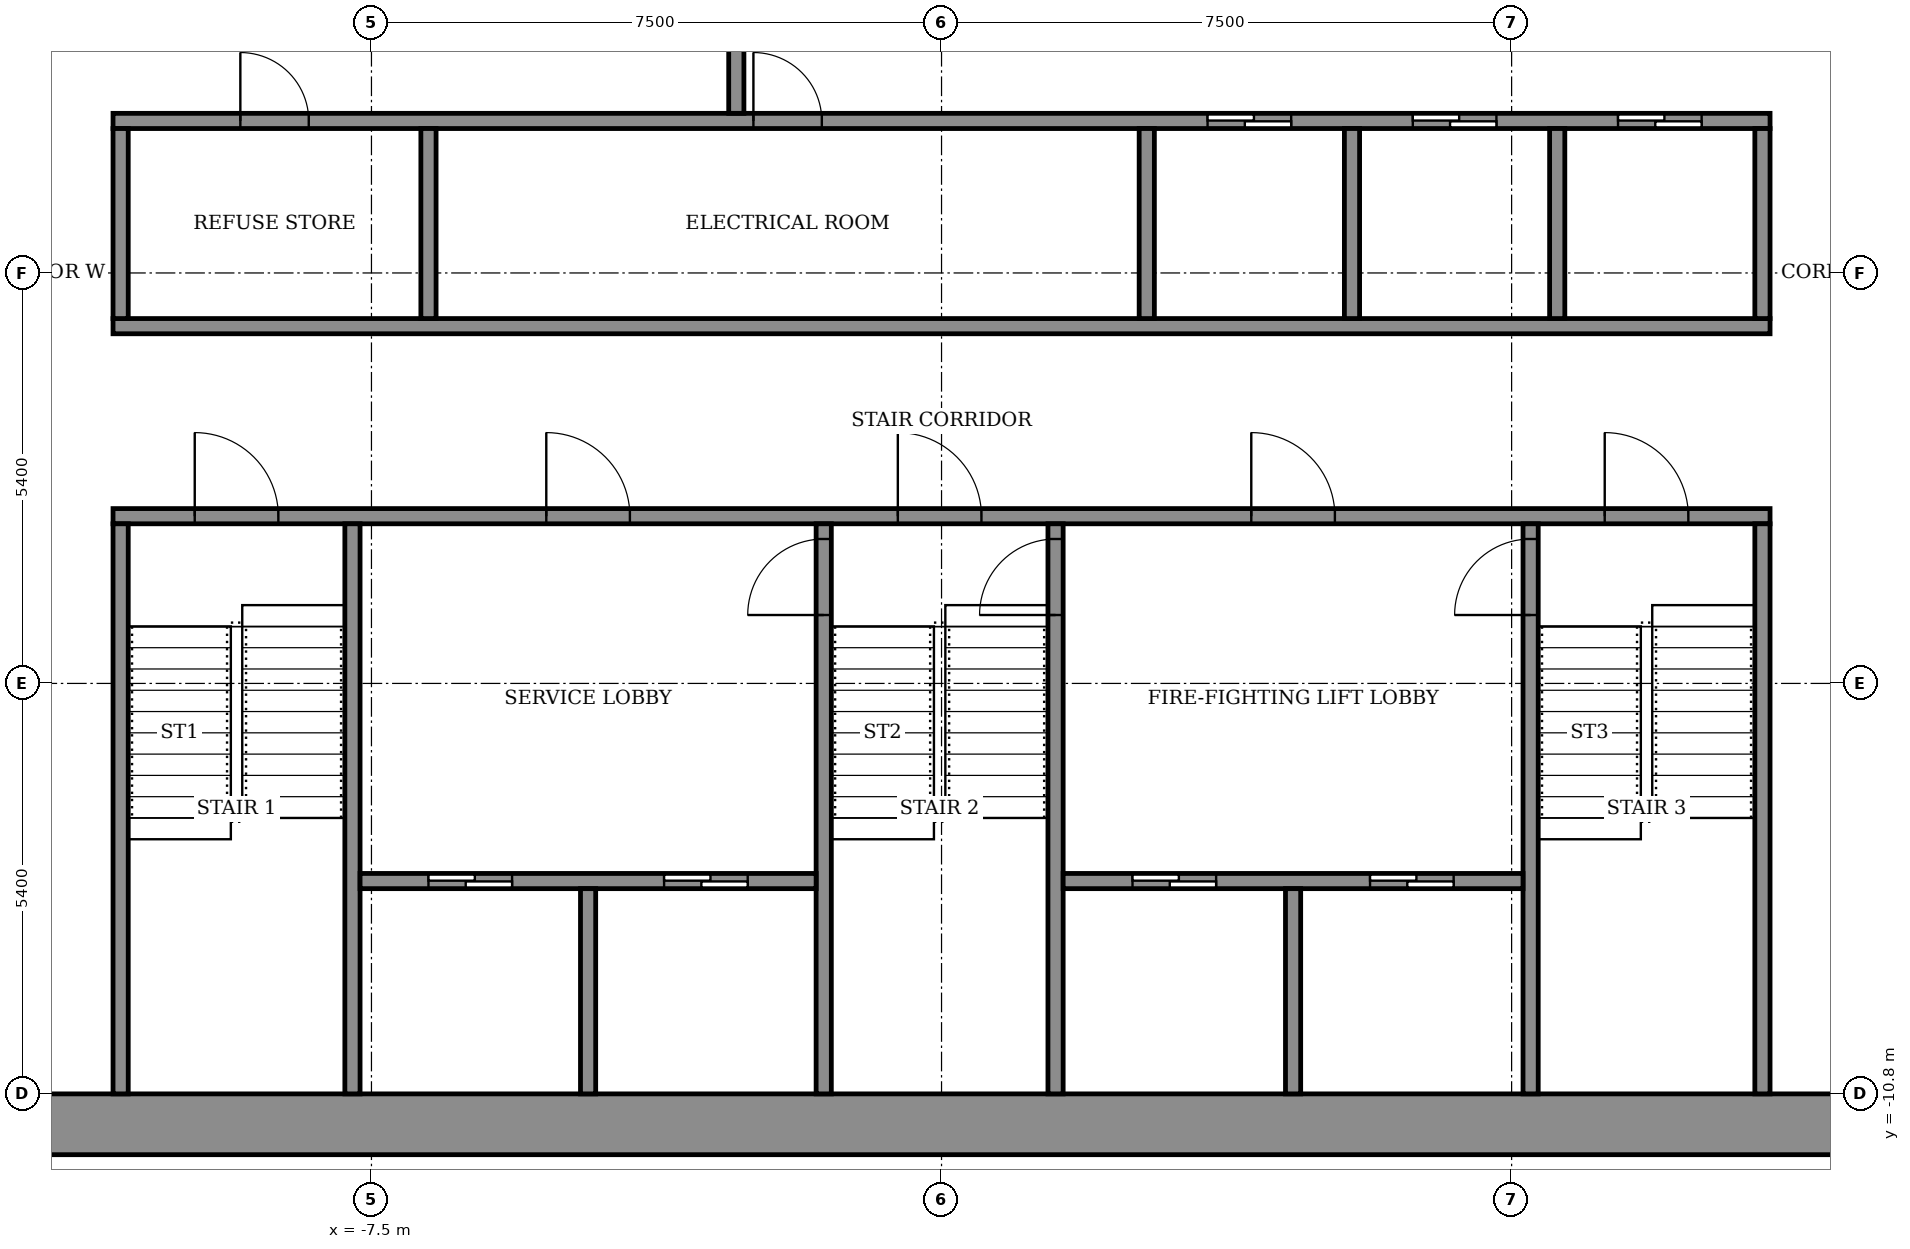
"""IFC4 building model, lengths in metres.
Left out: names, types, materials, properties, quantities, classifications, styles, units other than length and angle.
Written with IfcOpenShell. Run it as: python <this file> out.ifc"""

import sys

from ifc_helpers import new_model, si_unit, direction, frame, frame_2d, origin, place, context, subcontext, project, spatial, rectangle, extrude, element, fill, save


model = new_model("IFC4")
c1 = context("Model", 3, precision=1e-05, world=origin(), true_north=direction((0.0, 1.0)))
c2 = subcontext(c1, "Body", "Model", "MODEL_VIEW")
j1 = project(units=[si_unit("LENGTHUNIT", "METRE"), si_unit("PLANEANGLEUNIT", "RADIAN")], contexts=[c1])
p1 = place(None, origin())
s1 = spatial("IfcSite", under=j1, at=p1, CompositionType="ELEMENT")
p2 = place(p1, origin())
s2 = spatial("IfcBuilding", under=s1, at=p2, CompositionType="ELEMENT")
p3 = place(p2, frame((0.0, 0.0, 197.9)))
s3 = spatial("IfcBuildingStorey", under=s2, at=p3, CompositionType="ELEMENT", Elevation=197.9)
p4 = place(p3, frame((-14.6, -11.2, 0.0), z_axis=(0.0, 0.0, 1.0), x_axis=(1.0, 0.0, 0.0)))
e1 = element("IfcWall", 1, at=p4, inside=s3, PredefinedType="SHEAR", context=c2, shape_type="SweptSolid", body=[
    extrude(rectangle(XDim=29.2, YDim=0.8, at=frame_2d((14.6, 0.0))), origin(), (0.0, 0.0, 1.0), 3.6),
])
p5 = place(p3, frame((-10.9, -3.2, 0.0), z_axis=(0.0, 0.0, 1.0), x_axis=(1.0, 0.0, 0.0)))
e2 = element("IfcWall", 2, at=p5, inside=s3, PredefinedType="SHEAR", context=c2, shape_type="SweptSolid", body=[
    extrude(rectangle(XDim=21.8, YDim=0.2, at=frame_2d((10.9, 0.0))), origin(), (0.0, 0.0, 1.0), 3.05),
])
p6 = place(p5, frame((1.075, 0.0, 0.0)))
e3 = element("IfcOpeningElement", 3, at=p6, cuts=e2, PredefinedType="OPENING", context=c2, shape_type="SweptSolid", body=[
    extrude(rectangle(XDim=1.1, YDim=2.1, at=frame_2d((0.55, 1.05))), frame((0.0, 0.11, 0.0), z_axis=(0.0, -1.0, 0.0), x_axis=(1.0, 0.0, 0.0)), (0.0, 0.0, 1.0), 0.22),
])
p7 = place(p5, frame((10.325, 0.0, 0.0)))
e4 = element("IfcOpeningElement", 4, at=p7, cuts=e2, PredefinedType="OPENING", context=c2, shape_type="SweptSolid", body=[
    extrude(rectangle(XDim=1.1, YDim=2.1, at=frame_2d((0.55, 1.05))), frame((0.0, 0.11, 0.0), z_axis=(0.0, -1.0, 0.0), x_axis=(1.0, 0.0, 0.0)), (0.0, 0.0, 1.0), 0.22),
])
p8 = place(p5, frame((19.625, 0.0, 0.0)))
e5 = element("IfcOpeningElement", 5, at=p8, cuts=e2, PredefinedType="OPENING", context=c2, shape_type="SweptSolid", body=[
    extrude(rectangle(XDim=1.1, YDim=2.1, at=frame_2d((0.55, 1.05))), frame((0.0, 0.11, 0.0), z_axis=(0.0, -1.0, 0.0), x_axis=(1.0, 0.0, 0.0)), (0.0, 0.0, 1.0), 0.22),
])
p9 = place(p5, frame((5.7, 0.0, 0.0)))
e6 = element("IfcOpeningElement", 6, at=p9, cuts=e2, PredefinedType="OPENING", context=c2, shape_type="SweptSolid", body=[
    extrude(rectangle(XDim=1.1, YDim=2.1, at=frame_2d((0.55, 1.05))), frame((0.0, 0.11, 0.0), z_axis=(0.0, -1.0, 0.0), x_axis=(1.0, 0.0, 0.0)), (0.0, 0.0, 1.0), 0.22),
])
p10 = place(p5, frame((14.975, 0.0, 0.0)))
e7 = element("IfcOpeningElement", 7, at=p10, cuts=e2, PredefinedType="OPENING", context=c2, shape_type="SweptSolid", body=[
    extrude(rectangle(XDim=1.1, YDim=2.1, at=frame_2d((0.55, 1.05))), frame((0.0, 0.11, 0.0), z_axis=(0.0, -1.0, 0.0), x_axis=(1.0, 0.0, 0.0)), (0.0, 0.0, 1.0), 0.22),
])
p11 = place(p3, frame((-10.9, -0.7, 0.0), z_axis=(0.0, 0.0, 1.0), x_axis=(1.0, 0.0, 0.0)))
e8 = element("IfcWall", 8, at=p11, inside=s3, PredefinedType="SHEAR", context=c2, shape_type="SweptSolid", body=[
    extrude(rectangle(XDim=21.8, YDim=0.2, at=frame_2d((10.9, 0.0))), origin(), (0.0, 0.0, 1.0), 3.05),
])
p12 = place(p3, frame((-10.9, 2.0, 0.0), z_axis=(0.0, 0.0, 1.0), x_axis=(1.0, 0.0, 0.0)))
e9 = element("IfcWall", 9, at=p12, inside=s3, PredefinedType="SHEAR", context=c2, shape_type="SweptSolid", body=[
    extrude(rectangle(XDim=21.8, YDim=0.2, at=frame_2d((10.9, 0.0))), origin(), (0.0, 0.0, 1.0), 3.05),
])
p13 = place(p12, frame((14.4, 0.0, 0.0)))
e10 = element("IfcOpeningElement", 10, at=p13, cuts=e9, PredefinedType="OPENING", context=c2, shape_type="SweptSolid", body=[
    extrude(rectangle(XDim=1.1, YDim=2.1, at=frame_2d((0.55, 1.05))), frame((0.0, 0.11, 0.0), z_axis=(0.0, -1.0, 0.0), x_axis=(1.0, 0.0, 0.0)), (0.0, 0.0, 1.0), 0.22),
])
p14 = place(p12, frame((17.1, 0.0, 0.0)))
e11 = element("IfcOpeningElement", 11, at=p14, cuts=e9, PredefinedType="OPENING", context=c2, shape_type="SweptSolid", body=[
    extrude(rectangle(XDim=1.1, YDim=2.1, at=frame_2d((0.55, 1.05))), frame((0.0, 0.11, 0.0), z_axis=(0.0, -1.0, 0.0), x_axis=(1.0, 0.0, 0.0)), (0.0, 0.0, 1.0), 0.22),
])
p15 = place(p12, frame((19.8, 0.0, 0.0)))
e12 = element("IfcOpeningElement", 12, at=p15, cuts=e9, PredefinedType="OPENING", context=c2, shape_type="SweptSolid", body=[
    extrude(rectangle(XDim=1.1, YDim=2.1, at=frame_2d((0.55, 1.05))), frame((0.0, 0.11, 0.0), z_axis=(0.0, -1.0, 0.0), x_axis=(1.0, 0.0, 0.0)), (0.0, 0.0, 1.0), 0.22),
])
p16 = place(p12, frame((1.675, 0.0, 0.0)))
e13 = element("IfcOpeningElement", 13, at=p16, cuts=e9, PredefinedType="OPENING", context=c2, shape_type="SweptSolid", body=[
    extrude(rectangle(XDim=0.9, YDim=2.1, at=frame_2d((0.45, 1.05))), frame((0.0, 0.11, 0.0), z_axis=(0.0, -1.0, 0.0), x_axis=(1.0, 0.0, 0.0)), (0.0, 0.0, 1.0), 0.22),
])
p17 = place(p12, frame((8.425, 0.0, 0.0)))
e14 = element("IfcOpeningElement", 14, at=p17, cuts=e9, PredefinedType="OPENING", context=c2, shape_type="SweptSolid", body=[
    extrude(rectangle(XDim=0.9, YDim=2.1, at=frame_2d((0.45, 1.05))), frame((0.0, 0.11, 0.0), z_axis=(0.0, -1.0, 0.0), x_axis=(1.0, 0.0, 0.0)), (0.0, 0.0, 1.0), 0.22),
])
for number, where, z_axis, x_axis in (
    (15, (-10.8, -10.8, 0.0), (0.0, 0.0, 1.0), (0.0, 1.0, 0.0)),
    (16, (-7.75, -10.8, 0.0), (0.0, 0.0, 1.0), (0.0, 1.0, 0.0)),
):
    element("IfcWall", number, at=place(p3, frame(where, z_axis=z_axis, x_axis=x_axis)), inside=s3, PredefinedType="SHEAR", context=c2, shape_type="SweptSolid", body=[
        extrude(rectangle(XDim=7.5, YDim=0.2, at=frame_2d((3.75, 0.0))), origin(), (0.0, 0.0, 1.0), 3.05),
    ])
p18 = place(p3, frame((-1.55, -10.8, 0.0), z_axis=(0.0, 0.0, 1.0), x_axis=(0.0, 1.0, 0.0)))
e17 = element("IfcWall", 17, at=p18, inside=s3, PredefinedType="SHEAR", context=c2, shape_type="SweptSolid", body=[
    extrude(rectangle(XDim=7.5, YDim=0.2, at=frame_2d((3.75, 0.0))), origin(), (0.0, 0.0, 1.0), 3.05),
])
p19 = place(p18, frame((6.3, 0.0, 0.0)))
e18 = element("IfcOpeningElement", 18, at=p19, cuts=e17, PredefinedType="OPENING", context=c2, shape_type="SweptSolid", body=[
    extrude(rectangle(XDim=1.0, YDim=2.1, at=frame_2d((0.5, 1.05))), frame((0.0, 0.11, 0.0), z_axis=(0.0, -1.0, 0.0), x_axis=(1.0, 0.0, 0.0)), (0.0, 0.0, 1.0), 0.22),
])
p20 = place(p3, frame((1.5, -10.8, 0.0), z_axis=(0.0, 0.0, 1.0), x_axis=(0.0, 1.0, 0.0)))
e19 = element("IfcWall", 19, at=p20, inside=s3, PredefinedType="SHEAR", context=c2, shape_type="SweptSolid", body=[
    extrude(rectangle(XDim=7.5, YDim=0.2, at=frame_2d((3.75, 0.0))), origin(), (0.0, 0.0, 1.0), 3.05),
])
p21 = place(p20, frame((6.3, 0.0, 0.0)))
e20 = element("IfcOpeningElement", 20, at=p21, cuts=e19, PredefinedType="OPENING", context=c2, shape_type="SweptSolid", body=[
    extrude(rectangle(XDim=1.0, YDim=2.1, at=frame_2d((0.5, 1.05))), frame((0.0, 0.11, 0.0), z_axis=(0.0, -1.0, 0.0), x_axis=(1.0, 0.0, 0.0)), (0.0, 0.0, 1.0), 0.22),
])
p22 = place(p3, frame((7.75, -10.8, 0.0), z_axis=(0.0, 0.0, 1.0), x_axis=(0.0, 1.0, 0.0)))
e21 = element("IfcWall", 21, at=p22, inside=s3, PredefinedType="SHEAR", context=c2, shape_type="SweptSolid", body=[
    extrude(rectangle(XDim=7.5, YDim=0.2, at=frame_2d((3.75, 0.0))), origin(), (0.0, 0.0, 1.0), 3.05),
])
p23 = place(p22, frame((6.3, 0.0, 0.0)))
e22 = element("IfcOpeningElement", 22, at=p23, cuts=e21, PredefinedType="OPENING", context=c2, shape_type="SweptSolid", body=[
    extrude(rectangle(XDim=1.0, YDim=2.1, at=frame_2d((0.5, 1.05))), frame((0.0, 0.11, 0.0), z_axis=(0.0, -1.0, 0.0), x_axis=(1.0, 0.0, 0.0)), (0.0, 0.0, 1.0), 0.22),
])
p24 = place(p3, frame((10.8, -10.8, 0.0), z_axis=(0.0, 0.0, 1.0), x_axis=(0.0, 1.0, 0.0)))
e23 = element("IfcWall", 23, at=p24, inside=s3, PredefinedType="SHEAR", context=c2, shape_type="SweptSolid", body=[
    extrude(rectangle(XDim=7.5, YDim=0.2, at=frame_2d((3.75, 0.0))), origin(), (0.0, 0.0, 1.0), 3.05),
])
p25 = place(p3, frame((-7.65, -8.0, 0.0), z_axis=(0.0, 0.0, 1.0), x_axis=(1.0, 0.0, 0.0)))
e24 = element("IfcWall", 24, at=p25, inside=s3, PredefinedType="SHEAR", context=c2, shape_type="SweptSolid", body=[
    extrude(rectangle(XDim=6.0, YDim=0.2, at=frame_2d((3.0, 0.0))), origin(), (0.0, 0.0, 1.0), 3.05),
])
p26 = place(p25, frame((0.9, 0.0, 0.0)))
e25 = element("IfcOpeningElement", 25, at=p26, cuts=e24, PredefinedType="OPENING", context=c2, shape_type="SweptSolid", body=[
    extrude(rectangle(XDim=1.1, YDim=2.1, at=frame_2d((0.55, 1.05))), frame((0.0, 0.11, 0.0), z_axis=(0.0, -1.0, 0.0), x_axis=(1.0, 0.0, 0.0)), (0.0, 0.0, 1.0), 0.22),
])
p27 = place(p25, frame((4.0, 0.0, 0.0)))
e26 = element("IfcOpeningElement", 26, at=p27, cuts=e24, PredefinedType="OPENING", context=c2, shape_type="SweptSolid", body=[
    extrude(rectangle(XDim=1.1, YDim=2.1, at=frame_2d((0.55, 1.05))), frame((0.0, 0.11, 0.0), z_axis=(0.0, -1.0, 0.0), x_axis=(1.0, 0.0, 0.0)), (0.0, 0.0, 1.0), 0.22),
])
p28 = place(p3, frame((-4.65, -10.8, 0.0), z_axis=(0.0, 0.0, 1.0), x_axis=(0.0, 1.0, 0.0)))
e27 = element("IfcWall", 27, at=p28, inside=s3, PredefinedType="SHEAR", context=c2, shape_type="SweptSolid", body=[
    extrude(rectangle(XDim=2.7, YDim=0.2, at=frame_2d((1.35, 0.0))), origin(), (0.0, 0.0, 1.0), 3.05),
])
p29 = place(p3, frame((1.6, -8.0, 0.0), z_axis=(0.0, 0.0, 1.0), x_axis=(1.0, 0.0, 0.0)))
e28 = element("IfcWall", 28, at=p29, inside=s3, PredefinedType="SHEAR", context=c2, shape_type="SweptSolid", body=[
    extrude(rectangle(XDim=6.05, YDim=0.2, at=frame_2d((3.025, 0.0))), origin(), (0.0, 0.0, 1.0), 3.05),
])
p30 = place(p29, frame((0.913, 0.0, 0.0)))
e29 = element("IfcOpeningElement", 29, at=p30, cuts=e28, PredefinedType="OPENING", context=c2, shape_type="SweptSolid", body=[
    extrude(rectangle(XDim=1.1, YDim=2.1, at=frame_2d((0.55, 1.05))), frame((0.0, 0.11, 0.0), z_axis=(0.0, -1.0, 0.0), x_axis=(1.0, 0.0, 0.0)), (0.0, 0.0, 1.0), 0.22),
])
p31 = place(p29, frame((4.038, 0.0, 0.0)))
e30 = element("IfcOpeningElement", 30, at=p31, cuts=e28, PredefinedType="OPENING", context=c2, shape_type="SweptSolid", body=[
    extrude(rectangle(XDim=1.1, YDim=2.1, at=frame_2d((0.55, 1.05))), frame((0.0, 0.11, 0.0), z_axis=(0.0, -1.0, 0.0), x_axis=(1.0, 0.0, 0.0)), (0.0, 0.0, 1.0), 0.22),
])
p32 = place(p3, frame((4.625, -10.8, 0.0), z_axis=(0.0, 0.0, 1.0), x_axis=(0.0, 1.0, 0.0)))
e31 = element("IfcWall", 31, at=p32, inside=s3, PredefinedType="SHEAR", context=c2, shape_type="SweptSolid", body=[
    extrude(rectangle(XDim=2.7, YDim=0.2, at=frame_2d((1.35, 0.0))), origin(), (0.0, 0.0, 1.0), 3.05),
])
for number, where, z_axis, x_axis in (
    (32, (-10.8, -0.6, 0.0), (0.0, 0.0, 1.0), (0.0, 1.0, 0.0)),
    (33, (-6.75, -0.6, 0.0), (0.0, 0.0, 1.0), (0.0, 1.0, 0.0)),
):
    element("IfcWall", number, at=place(p3, frame(where, z_axis=z_axis, x_axis=x_axis)), inside=s3, PredefinedType="STANDARD", context=c2, shape_type="SweptSolid", body=[
        extrude(rectangle(XDim=2.5, YDim=0.2, at=frame_2d((1.25, 0.0))), origin(), (0.0, 0.0, 1.0), 3.05),
    ])
for number, where, z_axis, x_axis in (
    (34, (2.7, -0.6, 0.0), (0.0, 0.0, 1.0), (0.0, 1.0, 0.0)),
    (35, (5.4, -0.6, 0.0), (0.0, 0.0, 1.0), (0.0, 1.0, 0.0)),
    (36, (8.1, -0.6, 0.0), (0.0, 0.0, 1.0), (0.0, 1.0, 0.0)),
    (37, (10.8, -0.6, 0.0), (0.0, 0.0, 1.0), (0.0, 1.0, 0.0)),
):
    element("IfcWall", number, at=place(p3, frame(where, z_axis=z_axis, x_axis=x_axis)), inside=s3, PredefinedType="SHEAR", context=c2, shape_type="SweptSolid", body=[
        extrude(rectangle(XDim=2.5, YDim=0.2, at=frame_2d((1.25, 0.0))), origin(), (0.0, 0.0, 1.0), 3.05),
    ])
p33 = place(p3, frame((-2.7, 2.1, 0.0), z_axis=(0.0, 0.0, 1.0), x_axis=(0.0, 1.0, 0.0)))
e38 = element("IfcWall", 38, at=p33, inside=s3, PredefinedType="STANDARD", context=c2, shape_type="SweptSolid", body=[
    extrude(rectangle(XDim=5.9, YDim=0.2, at=frame_2d((2.95, 0.0))), origin(), (0.0, 0.0, 1.0), 3.05),
])
p34 = place(p33, frame((2.35, 0.0, 0.0)))
e39 = element("IfcOpeningElement", 39, at=p34, cuts=e38, PredefinedType="OPENING", context=c2, shape_type="SweptSolid", body=[
    extrude(rectangle(XDim=1.2, YDim=2.1, at=frame_2d((0.6, 1.05))), frame((0.0, 0.11, 0.0), z_axis=(0.0, -1.0, 0.0), x_axis=(1.0, 0.0, 0.0)), (0.0, 0.0, 1.0), 0.22),
])
p35 = place(p13, origin())
e40 = element("IfcDoor", 40, at=p35, inside=s3, OperationType="SLIDING_TO_LEFT", PredefinedType="DOOR", context=c2, shape_type="SweptSolid", body=[
    extrude(rectangle(XDim=1.1, YDim=2.1, at=frame_2d((0.55, 1.05))), frame((0.0, 0.025, 0.0), z_axis=(0.0, -1.0, 0.0), x_axis=(1.0, 0.0, 0.0)), (0.0, 0.0, 1.0), 0.05),
])
fill(e10, e40)
p36 = place(p14, origin())
e41 = element("IfcDoor", 41, at=p36, inside=s3, OperationType="SLIDING_TO_LEFT", PredefinedType="DOOR", context=c2, shape_type="SweptSolid", body=[
    extrude(rectangle(XDim=1.1, YDim=2.1, at=frame_2d((0.55, 1.05))), frame((0.0, 0.025, 0.0), z_axis=(0.0, -1.0, 0.0), x_axis=(1.0, 0.0, 0.0)), (0.0, 0.0, 1.0), 0.05),
])
fill(e11, e41)
p37 = place(p15, origin())
e42 = element("IfcDoor", 42, at=p37, inside=s3, OperationType="SLIDING_TO_LEFT", PredefinedType="DOOR", context=c2, shape_type="SweptSolid", body=[
    extrude(rectangle(XDim=1.1, YDim=2.1, at=frame_2d((0.55, 1.05))), frame((0.0, 0.025, 0.0), z_axis=(0.0, -1.0, 0.0), x_axis=(1.0, 0.0, 0.0)), (0.0, 0.0, 1.0), 0.05),
])
fill(e12, e42)
p38 = place(p16, origin())
e43 = element("IfcDoor", 43, at=p38, inside=s3, OperationType="SINGLE_SWING_RIGHT", PredefinedType="DOOR", context=c2, shape_type="SweptSolid", body=[
    extrude(rectangle(XDim=0.9, YDim=2.1, at=frame_2d((0.45, 1.05))), frame((0.0, 0.025, 0.0), z_axis=(0.0, -1.0, 0.0), x_axis=(1.0, 0.0, 0.0)), (0.0, 0.0, 1.0), 0.05),
])
fill(e13, e43)
p39 = place(p17, origin())
e44 = element("IfcDoor", 44, at=p39, inside=s3, OperationType="SINGLE_SWING_LEFT", PredefinedType="DOOR", context=c2, shape_type="SweptSolid", body=[
    extrude(rectangle(XDim=0.9, YDim=2.1, at=frame_2d((0.45, 1.05))), frame((0.0, 0.025, 0.0), z_axis=(0.0, -1.0, 0.0), x_axis=(1.0, 0.0, 0.0)), (0.0, 0.0, 1.0), 0.05),
])
fill(e14, e44)
p40 = place(p30, origin())
e45 = element("IfcDoor", 45, at=p40, inside=s3, OperationType="SLIDING_TO_LEFT", PredefinedType="DOOR", context=c2, shape_type="SweptSolid", body=[
    extrude(rectangle(XDim=1.1, YDim=2.1, at=frame_2d((0.55, 1.05))), frame((0.0, 0.025, 0.0), z_axis=(0.0, -1.0, 0.0), x_axis=(1.0, 0.0, 0.0)), (0.0, 0.0, 1.0), 0.05),
])
fill(e29, e45)
p41 = place(p26, origin())
e46 = element("IfcDoor", 46, at=p41, inside=s3, OperationType="SLIDING_TO_LEFT", PredefinedType="DOOR", context=c2, shape_type="SweptSolid", body=[
    extrude(rectangle(XDim=1.1, YDim=2.1, at=frame_2d((0.55, 1.05))), frame((0.0, 0.025, 0.0), z_axis=(0.0, -1.0, 0.0), x_axis=(1.0, 0.0, 0.0)), (0.0, 0.0, 1.0), 0.05),
])
fill(e25, e46)
p42 = place(p31, origin())
e47 = element("IfcDoor", 47, at=p42, inside=s3, OperationType="SLIDING_TO_LEFT", PredefinedType="DOOR", context=c2, shape_type="SweptSolid", body=[
    extrude(rectangle(XDim=1.1, YDim=2.1, at=frame_2d((0.55, 1.05))), frame((0.0, 0.025, 0.0), z_axis=(0.0, -1.0, 0.0), x_axis=(1.0, 0.0, 0.0)), (0.0, 0.0, 1.0), 0.05),
])
fill(e30, e47)
p43 = place(p27, origin())
e48 = element("IfcDoor", 48, at=p43, inside=s3, OperationType="SLIDING_TO_LEFT", PredefinedType="DOOR", context=c2, shape_type="SweptSolid", body=[
    extrude(rectangle(XDim=1.1, YDim=2.1, at=frame_2d((0.55, 1.05))), frame((0.0, 0.025, 0.0), z_axis=(0.0, -1.0, 0.0), x_axis=(1.0, 0.0, 0.0)), (0.0, 0.0, 1.0), 0.05),
])
fill(e26, e48)
p44 = place(p6, origin())
e49 = element("IfcDoor", 49, at=p44, inside=s3, OperationType="SINGLE_SWING_RIGHT", PredefinedType="DOOR", context=c2, shape_type="SweptSolid", body=[
    extrude(rectangle(XDim=1.1, YDim=2.1, at=frame_2d((0.55, 1.05))), frame((0.0, 0.025, 0.0), z_axis=(0.0, -1.0, 0.0), x_axis=(1.0, 0.0, 0.0)), (0.0, 0.0, 1.0), 0.05),
])
fill(e3, e49)
p45 = place(p7, origin())
e50 = element("IfcDoor", 50, at=p45, inside=s3, OperationType="SINGLE_SWING_RIGHT", PredefinedType="DOOR", context=c2, shape_type="SweptSolid", body=[
    extrude(rectangle(XDim=1.1, YDim=2.1, at=frame_2d((0.55, 1.05))), frame((0.0, 0.025, 0.0), z_axis=(0.0, -1.0, 0.0), x_axis=(1.0, 0.0, 0.0)), (0.0, 0.0, 1.0), 0.05),
])
fill(e4, e50)
p46 = place(p8, origin())
e51 = element("IfcDoor", 51, at=p46, inside=s3, OperationType="SINGLE_SWING_RIGHT", PredefinedType="DOOR", context=c2, shape_type="SweptSolid", body=[
    extrude(rectangle(XDim=1.1, YDim=2.1, at=frame_2d((0.55, 1.05))), frame((0.0, 0.025, 0.0), z_axis=(0.0, -1.0, 0.0), x_axis=(1.0, 0.0, 0.0)), (0.0, 0.0, 1.0), 0.05),
])
fill(e5, e51)
p47 = place(p9, origin())
e52 = element("IfcDoor", 52, at=p47, inside=s3, OperationType="SINGLE_SWING_LEFT", PredefinedType="DOOR", context=c2, shape_type="SweptSolid", body=[
    extrude(rectangle(XDim=1.1, YDim=2.1, at=frame_2d((0.55, 1.05))), frame((0.0, 0.025, 0.0), z_axis=(0.0, -1.0, 0.0), x_axis=(1.0, 0.0, 0.0)), (0.0, 0.0, 1.0), 0.05),
])
fill(e6, e52)
p48 = place(p10, origin())
e53 = element("IfcDoor", 53, at=p48, inside=s3, OperationType="SINGLE_SWING_LEFT", PredefinedType="DOOR", context=c2, shape_type="SweptSolid", body=[
    extrude(rectangle(XDim=1.1, YDim=2.1, at=frame_2d((0.55, 1.05))), frame((0.0, 0.025, 0.0), z_axis=(0.0, -1.0, 0.0), x_axis=(1.0, 0.0, 0.0)), (0.0, 0.0, 1.0), 0.05),
])
fill(e7, e53)
p49 = place(p19, origin())
e54 = element("IfcDoor", 54, at=p49, inside=s3, OperationType="SINGLE_SWING_RIGHT", PredefinedType="DOOR", context=c2, shape_type="SweptSolid", body=[
    extrude(rectangle(XDim=1.0, YDim=2.1, at=frame_2d((0.5, 1.05))), frame((0.0, 0.025, 0.0), z_axis=(0.0, -1.0, 0.0), x_axis=(1.0, 0.0, 0.0)), (0.0, 0.0, 1.0), 0.05),
])
fill(e18, e54)
p50 = place(p21, origin())
e55 = element("IfcDoor", 55, at=p50, inside=s3, OperationType="SINGLE_SWING_RIGHT", PredefinedType="DOOR", context=c2, shape_type="SweptSolid", body=[
    extrude(rectangle(XDim=1.0, YDim=2.1, at=frame_2d((0.5, 1.05))), frame((0.0, 0.025, 0.0), z_axis=(0.0, -1.0, 0.0), x_axis=(1.0, 0.0, 0.0)), (0.0, 0.0, 1.0), 0.05),
])
fill(e20, e55)
p51 = place(p23, origin())
e56 = element("IfcDoor", 56, at=p51, inside=s3, OperationType="SINGLE_SWING_RIGHT", PredefinedType="DOOR", context=c2, shape_type="SweptSolid", body=[
    extrude(rectangle(XDim=1.0, YDim=2.1, at=frame_2d((0.5, 1.05))), frame((0.0, 0.025, 0.0), z_axis=(0.0, -1.0, 0.0), x_axis=(1.0, 0.0, 0.0)), (0.0, 0.0, 1.0), 0.05),
])
fill(e22, e56)
save(model, sys.argv[1])
